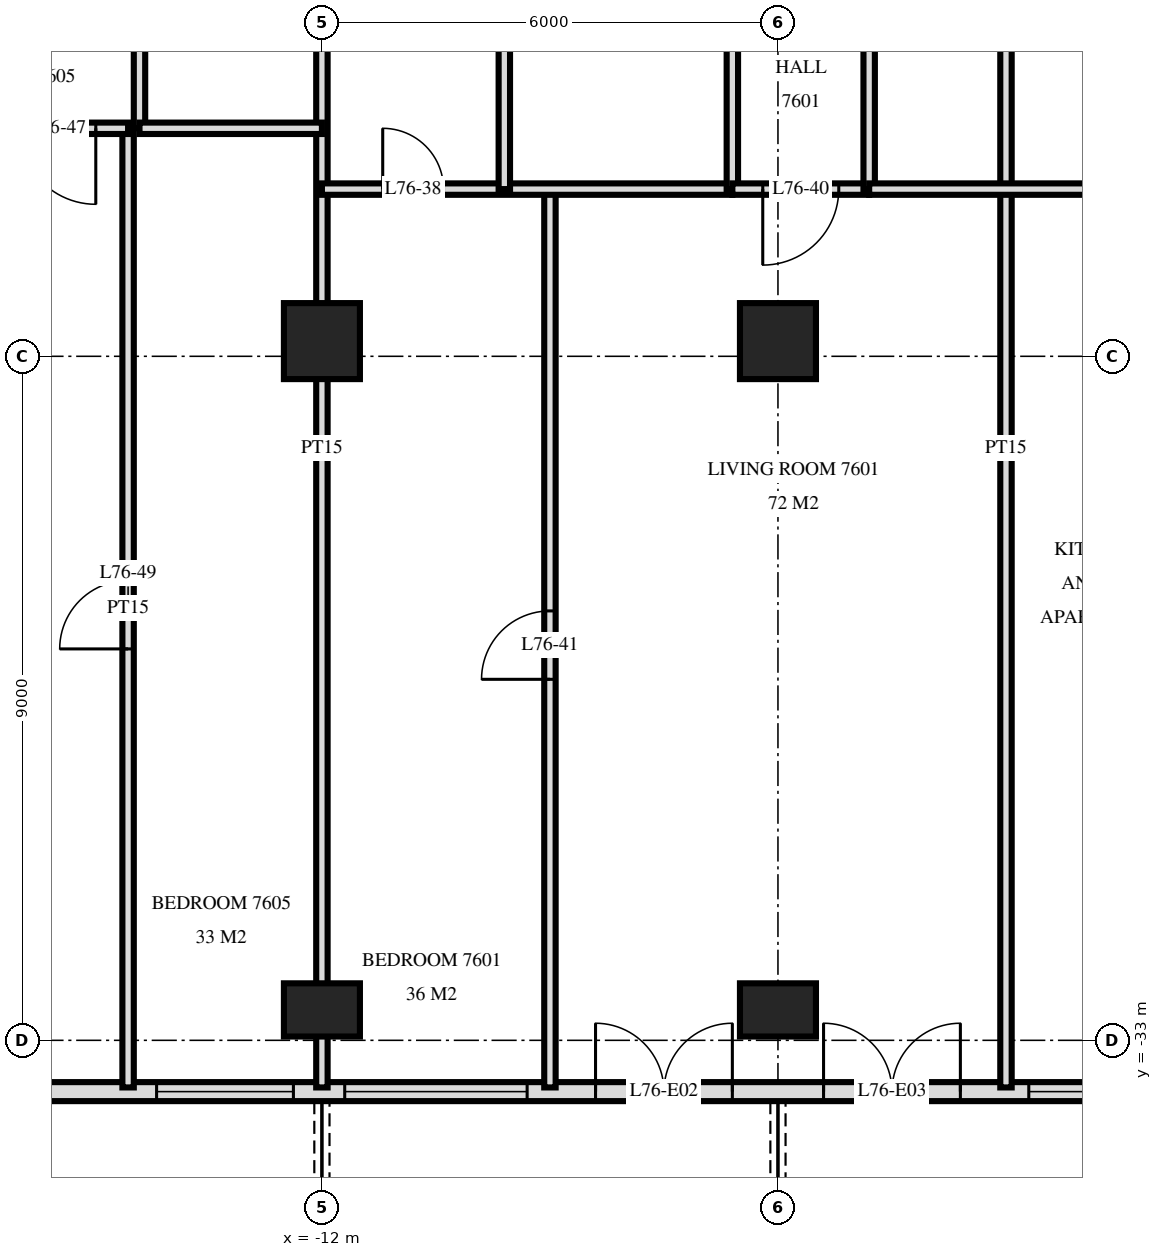
"""IFC4 building model, lengths in metres.
Left out: names, types, materials, properties, quantities, classifications, styles, units other than length and angle.
Written with IfcOpenShell. Run it as: python <this file> out.ifc"""

import sys

from ifc_helpers import new_model, si_unit, direction, frame, frame_2d, origin, origin_2d, place, context, subcontext, project, spatial, rectangle, extrude, element, fill, save


model = new_model("IFC4")
c1 = context("Model", 3, precision=1e-05, world=origin(), true_north=direction((0.0, 1.0)))
c2 = subcontext(c1, "Body", "Model", "MODEL_VIEW")
j1 = project(units=[si_unit("LENGTHUNIT", "METRE"), si_unit("PLANEANGLEUNIT", "RADIAN")], contexts=[c1])
p1 = place(None, origin())
s1 = spatial("IfcSite", under=j1, at=p1, CompositionType="ELEMENT")
p2 = place(p1, origin())
s2 = spatial("IfcBuilding", under=s1, at=p2, CompositionType="ELEMENT")
p3 = place(p2, frame((0.0, 0.0, 287.6)))
s3 = spatial("IfcBuildingStorey", under=s2, at=p3, CompositionType="ELEMENT", Elevation=287.6)
p4 = place(p3, frame((-12.0, -32.6, 0.0), z_axis=(0.0, 0.0, 1.0), x_axis=(1.0, 0.0, 0.0)))
e1 = element("IfcColumn", 1, at=p4, inside=s3, PredefinedType="COLUMN", context=c2, shape_type="SweptSolid", body=[
    extrude(rectangle(XDim=1.0, YDim=0.7, at=origin_2d()), origin(), (0.0, 0.0, 1.0), 3.5),
])
p5 = place(p3, frame((-12.0, -23.8, 0.0), z_axis=(0.0, 0.0, 1.0), x_axis=(1.0, 0.0, 0.0)))
e2 = element("IfcColumn", 2, at=p5, inside=s3, PredefinedType="COLUMN", context=c2, shape_type="SweptSolid", body=[
    extrude(rectangle(XDim=1.0, YDim=1.0, at=origin_2d()), origin(), (0.0, 0.0, 1.0), 3.5),
])
p6 = place(p3, frame((-6.0, -32.6, 0.0), z_axis=(0.0, 0.0, 1.0), x_axis=(1.0, 0.0, 0.0)))
e3 = element("IfcColumn", 3, at=p6, inside=s3, PredefinedType="COLUMN", context=c2, shape_type="SweptSolid", body=[
    extrude(rectangle(XDim=1.0, YDim=0.7, at=origin_2d()), origin(), (0.0, 0.0, 1.0), 3.5),
])
p7 = place(p3, frame((-6.0, -23.8, 0.0), z_axis=(0.0, 0.0, 1.0), x_axis=(1.0, 0.0, 0.0)))
e4 = element("IfcColumn", 4, at=p7, inside=s3, PredefinedType="COLUMN", context=c2, shape_type="SweptSolid", body=[
    extrude(rectangle(XDim=1.0, YDim=1.0, at=origin_2d()), origin(), (0.0, 0.0, 1.0), 3.5),
])
p8 = place(p3, frame((-18.575, -33.675, 0.0), z_axis=(0.0, 0.0, 1.0), x_axis=(1.0, 0.0, 0.0)))
e5 = element("IfcWall", 5, at=p8, inside=s3, PredefinedType="SOLIDWALL", context=c2, shape_type="SweptSolid", body=[
    extrude(rectangle(XDim=37.151, YDim=0.25, at=frame_2d((18.575, 0.0))), origin(), (0.0, 0.0, 1.0), 3.22),
])
p9 = place(p8, frame((1.175, 0.0, 0.0)))
e6 = element("IfcOpeningElement", 6, at=p9, cuts=e5, PredefinedType="OPENING", context=c2, shape_type="SweptSolid", body=[
    extrude(rectangle(XDim=1.8, YDim=2.4, at=frame_2d((0.9, 1.2))), frame((0.0, 0.135, 0.0), z_axis=(0.0, -1.0, 0.0), x_axis=(1.0, 0.0, 0.0)), (0.0, 0.0, 1.0), 0.27),
])
p10 = place(p8, frame((4.4, 0.0, 0.9)))
e7 = element("IfcOpeningElement", 7, at=p10, cuts=e5, PredefinedType="OPENING", context=c2, shape_type="SweptSolid", body=[
    extrude(rectangle(XDim=1.8, YDim=1.5, at=frame_2d((0.9, 0.75))), frame((0.0, 0.135, 0.0), z_axis=(0.0, -1.0, 0.0), x_axis=(1.0, 0.0, 0.0)), (0.0, 0.0, 1.0), 0.27),
])
p11 = place(p8, frame((6.875, 0.0, 0.9)))
e8 = element("IfcOpeningElement", 8, at=p11, cuts=e5, PredefinedType="OPENING", context=c2, shape_type="SweptSolid", body=[
    extrude(rectangle(XDim=2.4, YDim=1.5, at=frame_2d((1.2, 0.75))), frame((0.0, 0.135, 0.0), z_axis=(0.0, -1.0, 0.0), x_axis=(1.0, 0.0, 0.0)), (0.0, 0.0, 1.0), 0.27),
])
p12 = place(p8, frame((10.175, 0.0, 0.0)))
e9 = element("IfcOpeningElement", 9, at=p12, cuts=e5, PredefinedType="OPENING", context=c2, shape_type="SweptSolid", body=[
    extrude(rectangle(XDim=1.8, YDim=2.4, at=frame_2d((0.9, 1.2))), frame((0.0, 0.135, 0.0), z_axis=(0.0, -1.0, 0.0), x_axis=(1.0, 0.0, 0.0)), (0.0, 0.0, 1.0), 0.27),
])
p13 = place(p8, frame((13.175, 0.0, 0.0)))
e10 = element("IfcOpeningElement", 10, at=p13, cuts=e5, PredefinedType="OPENING", context=c2, shape_type="SweptSolid", body=[
    extrude(rectangle(XDim=1.8, YDim=2.4, at=frame_2d((0.9, 1.2))), frame((0.0, 0.135, 0.0), z_axis=(0.0, -1.0, 0.0), x_axis=(1.0, 0.0, 0.0)), (0.0, 0.0, 1.0), 0.27),
])
p14 = place(p8, frame((15.875, 0.0, 0.9)))
e11 = element("IfcOpeningElement", 11, at=p14, cuts=e5, PredefinedType="OPENING", context=c2, shape_type="SweptSolid", body=[
    extrude(rectangle(XDim=2.4, YDim=1.5, at=frame_2d((1.2, 0.75))), frame((0.0, 0.135, 0.0), z_axis=(0.0, -1.0, 0.0), x_axis=(1.0, 0.0, 0.0)), (0.0, 0.0, 1.0), 0.27),
])
p15 = place(p8, frame((19.175, 0.0, 0.0)))
e12 = element("IfcOpeningElement", 12, at=p15, cuts=e5, PredefinedType="OPENING", context=c2, shape_type="SweptSolid", body=[
    extrude(rectangle(XDim=1.8, YDim=2.4, at=frame_2d((0.9, 1.2))), frame((0.0, 0.135, 0.0), z_axis=(0.0, -1.0, 0.0), x_axis=(1.0, 0.0, 0.0)), (0.0, 0.0, 1.0), 0.27),
])
p16 = place(p8, frame((21.875, 0.0, 0.9)))
e13 = element("IfcOpeningElement", 13, at=p16, cuts=e5, PredefinedType="OPENING", context=c2, shape_type="SweptSolid", body=[
    extrude(rectangle(XDim=2.4, YDim=1.5, at=frame_2d((1.2, 0.75))), frame((0.0, 0.135, 0.0), z_axis=(0.0, -1.0, 0.0), x_axis=(1.0, 0.0, 0.0)), (0.0, 0.0, 1.0), 0.27),
])
p17 = place(p8, frame((25.063, 0.0, 0.9)))
e14 = element("IfcOpeningElement", 14, at=p17, cuts=e5, PredefinedType="OPENING", context=c2, shape_type="SweptSolid", body=[
    extrude(rectangle(XDim=1.8, YDim=1.5, at=frame_2d((0.9, 0.75))), frame((0.0, 0.135, 0.0), z_axis=(0.0, -1.0, 0.0), x_axis=(1.0, 0.0, 0.0)), (0.0, 0.0, 1.0), 0.27),
])
p18 = place(p8, frame((27.838, 0.0, 0.0)))
e15 = element("IfcOpeningElement", 15, at=p18, cuts=e5, PredefinedType="OPENING", context=c2, shape_type="SweptSolid", body=[
    extrude(rectangle(XDim=1.8, YDim=2.4, at=frame_2d((0.9, 1.2))), frame((0.0, 0.135, 0.0), z_axis=(0.0, -1.0, 0.0), x_axis=(1.0, 0.0, 0.0)), (0.0, 0.0, 1.0), 0.27),
])
p19 = place(p8, frame((31.175, 0.0, 0.0)))
e16 = element("IfcOpeningElement", 16, at=p19, cuts=e5, PredefinedType="OPENING", context=c2, shape_type="SweptSolid", body=[
    extrude(rectangle(XDim=1.8, YDim=2.4, at=frame_2d((0.9, 1.2))), frame((0.0, 0.135, 0.0), z_axis=(0.0, -1.0, 0.0), x_axis=(1.0, 0.0, 0.0)), (0.0, 0.0, 1.0), 0.27),
])
p20 = place(p3, frame((-3.0, -33.62, 0.0), z_axis=(0.0, 0.0, 1.0), x_axis=(0.0, 1.0, 0.0)))
e17 = element("IfcWall", 17, at=p20, inside=s3, PredefinedType="PARTITIONING", context=c2, shape_type="SweptSolid", body=[
    extrude(rectangle(XDim=16.82, YDim=0.15, at=frame_2d((8.41, 0.0))), origin(), (0.0, 0.0, 1.0), 3.22),
])
p21 = place(p3, frame((-4.8, -21.8, 0.0), z_axis=(0.0, 0.0, 1.0), x_axis=(0.0, 1.0, 0.0)))
e18 = element("IfcWall", 18, at=p21, inside=s3, PredefinedType="PARTITIONING", context=c2, shape_type="SweptSolid", body=[
    extrude(rectangle(XDim=5.0, YDim=0.15, at=frame_2d((2.5, 0.0))), origin(), (0.0, 0.0, 1.0), 3.22),
])
p22 = place(p3, frame((-6.6, -21.8, 0.0), z_axis=(0.0, 0.0, 1.0), x_axis=(0.0, 1.0, 0.0)))
e19 = element("IfcWall", 19, at=p22, inside=s3, PredefinedType="PARTITIONING", context=c2, shape_type="SweptSolid", body=[
    extrude(rectangle(XDim=5.0, YDim=0.15, at=frame_2d((2.5, 0.0))), origin(), (0.0, 0.0, 1.0), 3.22),
])
p23 = place(p22, frame((2.0, 0.0, 0.0)))
e20 = element("IfcOpeningElement", 20, at=p23, cuts=e19, PredefinedType="OPENING", context=c2, shape_type="SweptSolid", body=[
    extrude(rectangle(XDim=1.0, YDim=2.1, at=frame_2d((0.5, 1.05))), frame((0.0, 0.085, 0.0), z_axis=(0.0, -1.0, 0.0), x_axis=(1.0, 0.0, 0.0)), (0.0, 0.0, 1.0), 0.17),
])
p24 = place(p3, frame((-9.0, -33.62, 0.0), z_axis=(0.0, 0.0, 1.0), x_axis=(0.0, 1.0, 0.0)))
e21 = element("IfcWall", 21, at=p24, inside=s3, PredefinedType="PARTITIONING", context=c2, shape_type="SweptSolid", body=[
    extrude(rectangle(XDim=11.82, YDim=0.15, at=frame_2d((5.91, 0.0))), origin(), (0.0, 0.0, 1.0), 3.22),
])
p25 = place(p24, frame((5.37, 0.0, 0.0)))
e22 = element("IfcOpeningElement", 22, at=p25, cuts=e21, PredefinedType="OPENING", context=c2, shape_type="SweptSolid", body=[
    extrude(rectangle(XDim=0.9, YDim=2.1, at=frame_2d((0.45, 1.05))), frame((0.0, 0.085, 0.0), z_axis=(0.0, -1.0, 0.0), x_axis=(1.0, 0.0, 0.0)), (0.0, 0.0, 1.0), 0.17),
])
p26 = place(p3, frame((-9.6, -21.8, 0.0), z_axis=(0.0, 0.0, 1.0), x_axis=(0.0, 1.0, 0.0)))
e23 = element("IfcWall", 23, at=p26, inside=s3, PredefinedType="PARTITIONING", context=c2, shape_type="SweptSolid", body=[
    extrude(rectangle(XDim=5.0, YDim=0.15, at=frame_2d((2.5, 0.0))), origin(), (0.0, 0.0, 1.0), 3.22),
])
p27 = place(p3, frame((-12.0, -33.62, 0.0), z_axis=(0.0, 0.0, 1.0), x_axis=(0.0, 1.0, 0.0)))
e24 = element("IfcWall", 24, at=p27, inside=s3, PredefinedType="PARTITIONING", context=c2, shape_type="SweptSolid", body=[
    extrude(rectangle(XDim=16.82, YDim=0.15, at=frame_2d((8.41, 0.0))), origin(), (0.0, 0.0, 1.0), 3.22),
])
p28 = place(p3, frame((-14.4, -21.0, 0.0), z_axis=(0.0, 0.0, 1.0), x_axis=(0.0, 1.0, 0.0)))
e25 = element("IfcWall", 25, at=p28, inside=s3, PredefinedType="PARTITIONING", context=c2, shape_type="SweptSolid", body=[
    extrude(rectangle(XDim=4.2, YDim=0.15, at=frame_2d((2.1, 0.0))), origin(), (0.0, 0.0, 1.0), 3.22),
])
p29 = place(p28, frame((1.6, 0.0, 0.0)))
e26 = element("IfcOpeningElement", 26, at=p29, cuts=e25, PredefinedType="OPENING", context=c2, shape_type="SweptSolid", body=[
    extrude(rectangle(XDim=1.0, YDim=2.1, at=frame_2d((0.5, 1.05))), frame((0.0, 0.085, 0.0), z_axis=(0.0, -1.0, 0.0), x_axis=(1.0, 0.0, 0.0)), (0.0, 0.0, 1.0), 0.17),
])
p30 = place(p3, frame((-14.55, -33.62, 0.0), z_axis=(0.0, 0.0, 1.0), x_axis=(0.0, 1.0, 0.0)))
e27 = element("IfcWall", 27, at=p30, inside=s3, PredefinedType="PARTITIONING", context=c2, shape_type="SweptSolid", body=[
    extrude(rectangle(XDim=12.62, YDim=0.15, at=frame_2d((6.31, 0.0))), origin(), (0.0, 0.0, 1.0), 3.22),
])
p31 = place(p30, frame((5.77, 0.0, 0.0)))
e28 = element("IfcOpeningElement", 28, at=p31, cuts=e27, PredefinedType="OPENING", context=c2, shape_type="SweptSolid", body=[
    extrude(rectangle(XDim=0.9, YDim=2.1, at=frame_2d((0.45, 1.05))), frame((0.0, 0.085, 0.0), z_axis=(0.0, -1.0, 0.0), x_axis=(1.0, 0.0, 0.0)), (0.0, 0.0, 1.0), 0.17),
])
p32 = place(p3, frame((-6.6, -21.8, 0.0), z_axis=(0.0, 0.0, 1.0), x_axis=(1.0, 0.0, 0.0)))
e29 = element("IfcWall", 29, at=p32, inside=s3, PredefinedType="PARTITIONING", context=c2, shape_type="SweptSolid", body=[
    extrude(rectangle(XDim=1.8, YDim=0.15, at=frame_2d((0.9, 0.0))), origin(), (0.0, 0.0, 1.0), 3.22),
])
p33 = place(p32, frame((0.4, 0.0, 0.0)))
e30 = element("IfcOpeningElement", 30, at=p33, cuts=e29, PredefinedType="OPENING", context=c2, shape_type="SweptSolid", body=[
    extrude(rectangle(XDim=1.0, YDim=2.1, at=frame_2d((0.5, 1.05))), frame((0.0, 0.085, 0.0), z_axis=(0.0, -1.0, 0.0), x_axis=(1.0, 0.0, 0.0)), (0.0, 0.0, 1.0), 0.17),
])
p34 = place(p3, frame((-12.0, -21.8, 0.0), z_axis=(0.0, 0.0, 1.0), x_axis=(1.0, 0.0, 0.0)))
e31 = element("IfcWall", 31, at=p34, inside=s3, PredefinedType="PARTITIONING", context=c2, shape_type="SweptSolid", body=[
    extrude(rectangle(XDim=5.4, YDim=0.15, at=frame_2d((2.7, 0.0))), origin(), (0.0, 0.0, 1.0), 3.22),
])
p35 = place(p34, frame((0.8, 0.0, 0.0)))
e32 = element("IfcOpeningElement", 32, at=p35, cuts=e31, PredefinedType="OPENING", context=c2, shape_type="SweptSolid", body=[
    extrude(rectangle(XDim=0.8, YDim=2.1, at=frame_2d((0.4, 1.05))), frame((0.0, 0.085, 0.0), z_axis=(0.0, -1.0, 0.0), x_axis=(1.0, 0.0, 0.0)), (0.0, 0.0, 1.0), 0.17),
])
p36 = place(p3, frame((-4.8, -21.8, 0.0), z_axis=(0.0, 0.0, 1.0), x_axis=(1.0, 0.0, 0.0)))
e33 = element("IfcWall", 33, at=p36, inside=s3, PredefinedType="PARTITIONING", context=c2, shape_type="SweptSolid", body=[
    extrude(rectangle(XDim=3.5, YDim=0.15, at=frame_2d((1.75, 0.0))), origin(), (0.0, 0.0, 1.0), 3.22),
])
p37 = place(p3, frame((-16.4, -21.0, 0.0), z_axis=(0.0, 0.0, 1.0), x_axis=(1.0, 0.0, 0.0)))
e34 = element("IfcWall", 34, at=p37, inside=s3, PredefinedType="PARTITIONING", context=c2, shape_type="SweptSolid", body=[
    extrude(rectangle(XDim=1.85, YDim=0.15, at=frame_2d((0.925, 0.0))), origin(), (0.0, 0.0, 1.0), 3.22),
])
p38 = place(p37, frame((0.425, 0.0, 0.0)))
e35 = element("IfcOpeningElement", 35, at=p38, cuts=e34, PredefinedType="OPENING", context=c2, shape_type="SweptSolid", body=[
    extrude(rectangle(XDim=1.0, YDim=2.1, at=frame_2d((0.5, 1.05))), frame((0.0, 0.085, 0.0), z_axis=(0.0, -1.0, 0.0), x_axis=(1.0, 0.0, 0.0)), (0.0, 0.0, 1.0), 0.17),
])
p39 = place(p3, frame((-14.4, -21.0, 0.0), z_axis=(0.0, 0.0, 1.0), x_axis=(1.0, 0.0, 0.0)))
e36 = element("IfcWall", 36, at=p39, inside=s3, PredefinedType="PARTITIONING", context=c2, shape_type="SweptSolid", body=[
    extrude(rectangle(XDim=2.4, YDim=0.15, at=frame_2d((1.2, 0.0))), origin(), (0.0, 0.0, 1.0), 3.22),
])
p40 = place(p10, origin())
e37 = element("IfcWindow", 37, at=p40, inside=s3, PartitioningType="SINGLE_PANEL", PredefinedType="WINDOW", context=c2, shape_type="SweptSolid", body=[
    extrude(rectangle(XDim=1.8, YDim=1.5, at=frame_2d((0.9, 0.75))), frame((0.0, 0.03, 0.0), z_axis=(0.0, -1.0, 0.0), x_axis=(1.0, 0.0, 0.0)), (0.0, 0.0, 1.0), 0.06),
])
fill(e7, e37)
p41 = place(p11, origin())
e38 = element("IfcWindow", 38, at=p41, inside=s3, PartitioningType="SINGLE_PANEL", PredefinedType="WINDOW", context=c2, shape_type="SweptSolid", body=[
    extrude(rectangle(XDim=2.4, YDim=1.5, at=frame_2d((1.2, 0.75))), frame((0.0, 0.03, 0.0), z_axis=(0.0, -1.0, 0.0), x_axis=(1.0, 0.0, 0.0)), (0.0, 0.0, 1.0), 0.06),
])
fill(e8, e38)
p42 = place(p12, origin())
e39 = element("IfcDoor", 39, at=p42, inside=s3, OperationType="DOUBLE_DOOR_SINGLE_SWING", PredefinedType="DOOR", context=c2, shape_type="SweptSolid", body=[
    extrude(rectangle(XDim=1.8, YDim=2.4, at=frame_2d((0.9, 1.2))), frame((0.0, 0.025, 0.0), z_axis=(0.0, -1.0, 0.0), x_axis=(1.0, 0.0, 0.0)), (0.0, 0.0, 1.0), 0.05),
])
fill(e9, e39)
p43 = place(p13, origin())
e40 = element("IfcDoor", 40, at=p43, inside=s3, OperationType="DOUBLE_DOOR_SINGLE_SWING", PredefinedType="DOOR", context=c2, shape_type="SweptSolid", body=[
    extrude(rectangle(XDim=1.8, YDim=2.4, at=frame_2d((0.9, 1.2))), frame((0.0, 0.025, 0.0), z_axis=(0.0, -1.0, 0.0), x_axis=(1.0, 0.0, 0.0)), (0.0, 0.0, 1.0), 0.05),
])
fill(e10, e40)
p44 = place(p14, origin())
e41 = element("IfcWindow", 41, at=p44, inside=s3, PartitioningType="SINGLE_PANEL", PredefinedType="WINDOW", context=c2, shape_type="SweptSolid", body=[
    extrude(rectangle(XDim=2.4, YDim=1.5, at=frame_2d((1.2, 0.75))), frame((0.0, 0.03, 0.0), z_axis=(0.0, -1.0, 0.0), x_axis=(1.0, 0.0, 0.0)), (0.0, 0.0, 1.0), 0.06),
])
fill(e11, e41)
p45 = place(p35, origin())
e42 = element("IfcDoor", 42, at=p45, inside=s3, OperationType="SINGLE_SWING_RIGHT", PredefinedType="DOOR", context=c2, shape_type="SweptSolid", body=[
    extrude(rectangle(XDim=0.8, YDim=2.1, at=frame_2d((0.4, 1.05))), frame((0.0, 0.025, 0.0), z_axis=(0.0, -1.0, 0.0), x_axis=(1.0, 0.0, 0.0)), (0.0, 0.0, 1.0), 0.05),
])
fill(e32, e42)
p46 = place(p33, frame((0.5, 0.0, 0.0), z_axis=(0.0, 0.0, 1.0), x_axis=(-1.0, 0.0, 0.0)))
e43 = element("IfcDoor", 43, at=p46, inside=s3, OperationType="SINGLE_SWING_LEFT", PredefinedType="DOOR", context=c2, shape_type="SweptSolid", body=[
    extrude(rectangle(XDim=1.0, YDim=2.1, at=frame_2d((0.0, 1.05))), frame((0.0, -0.025, 0.0), z_axis=(0.0, 1.0, 0.0), x_axis=(-1.0, 0.0, 0.0)), (0.0, 0.0, 1.0), 0.05),
])
fill(e30, e43)
p47 = place(p25, origin())
e44 = element("IfcDoor", 44, at=p47, inside=s3, OperationType="SINGLE_SWING_RIGHT", PredefinedType="DOOR", context=c2, shape_type="SweptSolid", body=[
    extrude(rectangle(XDim=0.9, YDim=2.1, at=frame_2d((0.45, 1.05))), frame((0.0, 0.025, 0.0), z_axis=(0.0, -1.0, 0.0), x_axis=(1.0, 0.0, 0.0)), (0.0, 0.0, 1.0), 0.05),
])
fill(e22, e44)
p48 = place(p38, frame((0.5, 0.0, 0.0), z_axis=(0.0, 0.0, 1.0), x_axis=(-1.0, 0.0, 0.0)))
e45 = element("IfcDoor", 45, at=p48, inside=s3, OperationType="SINGLE_SWING_RIGHT", PredefinedType="DOOR", context=c2, shape_type="SweptSolid", body=[
    extrude(rectangle(XDim=1.0, YDim=2.1, at=frame_2d((0.0, 1.05))), frame((0.0, -0.025, 0.0), z_axis=(0.0, 1.0, 0.0), x_axis=(-1.0, 0.0, 0.0)), (0.0, 0.0, 1.0), 0.05),
])
fill(e35, e45)
p49 = place(p31, origin())
e46 = element("IfcDoor", 46, at=p49, inside=s3, OperationType="SINGLE_SWING_RIGHT", PredefinedType="DOOR", context=c2, shape_type="SweptSolid", body=[
    extrude(rectangle(XDim=0.9, YDim=2.1, at=frame_2d((0.45, 1.05))), frame((0.0, 0.025, 0.0), z_axis=(0.0, -1.0, 0.0), x_axis=(1.0, 0.0, 0.0)), (0.0, 0.0, 1.0), 0.05),
])
fill(e28, e46)
save(model, sys.argv[1])
